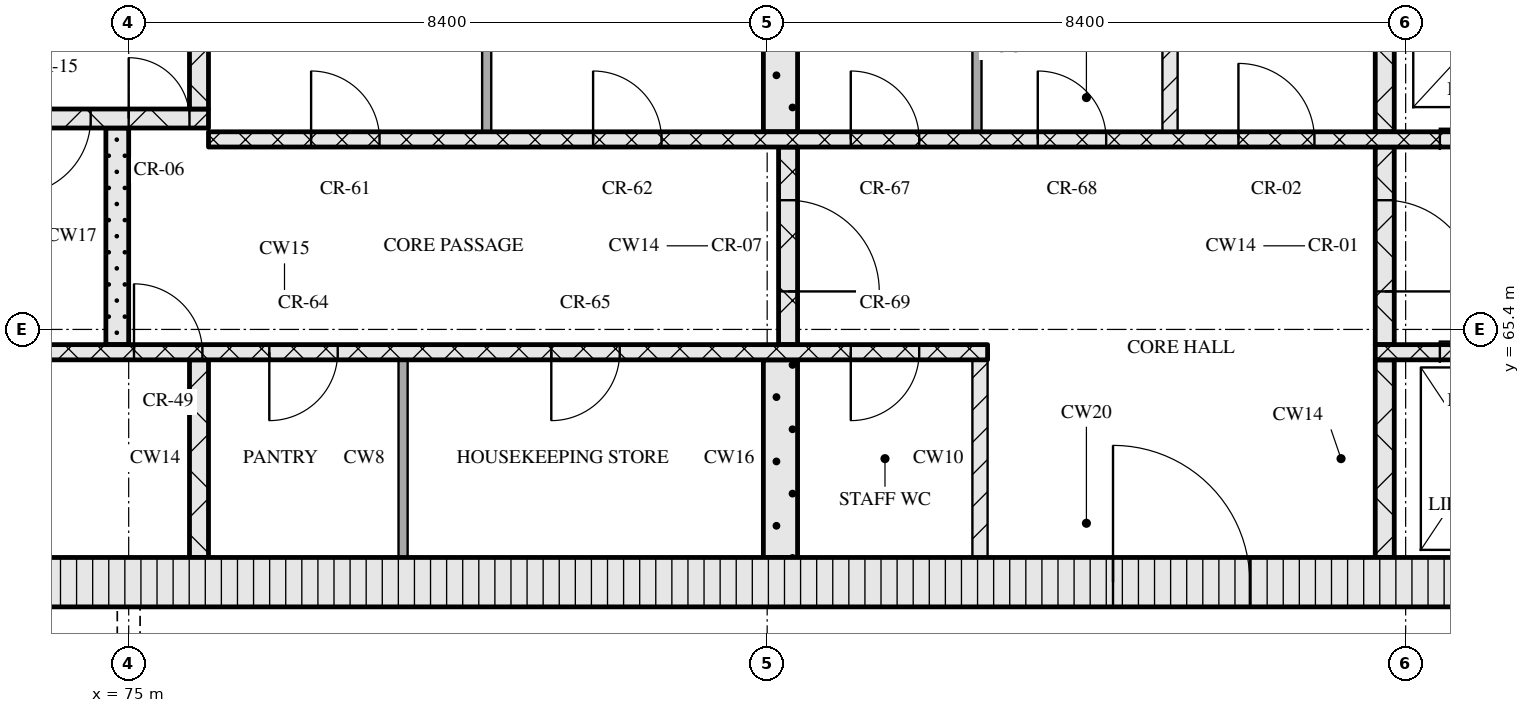
"""IFC4 building model, lengths in metres.
Left out: names, types, materials, properties, quantities, classifications, styles, units other than length and angle.
Written with IfcOpenShell. Run it as: python <this file> out.ifc"""

import sys

from ifc_helpers import new_model, si_unit, direction, frame, frame_2d, origin, place, context, subcontext, project, spatial, rectangle, extrude, element, fill, save


model = new_model("IFC4")
c1 = context("Model", 3, precision=1e-05, world=origin(), true_north=direction((0.0, 1.0)))
c2 = subcontext(c1, "Body", "Model", "MODEL_VIEW")
j1 = project(units=[si_unit("LENGTHUNIT", "METRE"), si_unit("PLANEANGLEUNIT", "RADIAN")], contexts=[c1])
p1 = place(None, origin())
s1 = spatial("IfcSite", under=j1, at=p1, CompositionType="ELEMENT")
p2 = place(p1, origin())
s2 = spatial("IfcBuilding", under=s1, at=p2, CompositionType="ELEMENT")
p3 = place(p2, frame((0.0, 0.0, 227.1)))
s3 = spatial("IfcBuildingStorey", under=s2, at=p3, CompositionType="ELEMENT", Elevation=227.1)
p4 = place(p3, frame((67.15, 62.075, 0.0), z_axis=(0.0, 0.0, 1.0), x_axis=(1.0, 0.0, 0.0)))
e1 = element("IfcWall", 1, at=p4, inside=s3, PredefinedType="SOLIDWALL", context=c2, shape_type="SweptSolid", body=[
    extrude(rectangle(XDim=40.9, YDim=0.65, at=frame_2d((20.45, 0.0))), origin(), (0.0, 0.0, 1.0), 3.32),
])
p5 = place(p4, frame((20.8, 0.0, 0.0)))
e2 = element("IfcOpeningElement", 2, at=p5, cuts=e1, PredefinedType="OPENING", context=c2, shape_type="SweptSolid", body=[
    extrude(rectangle(XDim=1.8, YDim=2.1, at=frame_2d((0.9, 1.05))), frame((0.0, 0.335, 0.0), z_axis=(0.0, -1.0, 0.0), x_axis=(1.0, 0.0, 0.0)), (0.0, 0.0, 1.0), 0.67),
])
p6 = place(p3, frame((75.925, 62.4, 0.0), z_axis=(0.0, 0.0, 1.0), x_axis=(0.0, 1.0, 0.0)))
e3 = element("IfcWall", 3, at=p6, inside=s3, PredefinedType="SOLIDWALL", context=c2, shape_type="SweptSolid", body=[
    extrude(rectangle(XDim=2.6, YDim=0.25, at=frame_2d((1.3, 0.0))), origin(), (0.0, 0.0, 1.0), 3.32),
])
p7 = place(p3, frame((78.61, 62.4, 0.0), z_axis=(0.0, 0.0, 1.0), x_axis=(0.0, 1.0, 0.0)))
e4 = element("IfcWall", 4, at=p7, inside=s3, PredefinedType="PARTITIONING", context=c2, shape_type="SweptSolid", body=[
    extrude(rectangle(XDim=2.6, YDim=0.12, at=frame_2d((1.3, 0.0))), origin(), (0.0, 0.0, 1.0), 3.32),
])
p8 = place(p3, frame((83.575, 62.4, 0.0), z_axis=(0.0, 0.0, 1.0), x_axis=(0.0, 1.0, 0.0)))
e5 = element("IfcWall", 5, at=p8, inside=s3, PredefinedType="SOLIDWALL", context=c2, shape_type="SweptSolid", body=[
    extrude(rectangle(XDim=2.6, YDim=0.45, at=frame_2d((1.3, 0.0))), origin(), (0.0, 0.0, 1.0), 3.32),
])
p9 = place(p3, frame((86.2, 62.4, 0.0), z_axis=(0.0, 0.0, 1.0), x_axis=(0.0, 1.0, 0.0)))
e6 = element("IfcWall", 6, at=p9, inside=s3, PredefinedType="PARTITIONING", context=c2, shape_type="SweptSolid", body=[
    extrude(rectangle(XDim=2.6, YDim=0.2, at=frame_2d((1.3, 0.0))), origin(), (0.0, 0.0, 1.0), 3.32),
])
p10 = place(p3, frame((91.525, 62.4, 0.0), z_axis=(0.0, 0.0, 1.0), x_axis=(0.0, 1.0, 0.0)))
e7 = element("IfcWall", 7, at=p10, inside=s3, PredefinedType="SOLIDWALL", context=c2, shape_type="SweptSolid", body=[
    extrude(rectangle(XDim=2.6, YDim=0.25, at=frame_2d((1.3, 0.0))), origin(), (0.0, 0.0, 1.0), 3.32),
])
p11 = place(p3, frame((67.8, 65.1, 0.0), z_axis=(0.0, 0.0, 1.0), x_axis=(1.0, 0.0, 0.0)))
e8 = element("IfcWall", 8, at=p11, inside=s3, PredefinedType="SOLIDWALL", context=c2, shape_type="SweptSolid", body=[
    extrude(rectangle(XDim=18.5, YDim=0.2, at=frame_2d((9.25, 0.0))), origin(), (0.0, 0.0, 1.0), 3.32),
])
p12 = place(p11, frame((7.27, 0.0, 0.0)))
e9 = element("IfcOpeningElement", 9, at=p12, cuts=e8, PredefinedType="OPENING", context=c2, shape_type="SweptSolid", body=[
    extrude(rectangle(XDim=0.9, YDim=2.1, at=frame_2d((0.45, 1.05))), frame((0.0, 0.11, 0.0), z_axis=(0.0, -1.0, 0.0), x_axis=(1.0, 0.0, 0.0)), (0.0, 0.0, 1.0), 0.22),
])
p13 = place(p11, frame((9.05, 0.0, 0.0)))
e10 = element("IfcOpeningElement", 10, at=p13, cuts=e8, PredefinedType="OPENING", context=c2, shape_type="SweptSolid", body=[
    extrude(rectangle(XDim=0.9, YDim=2.1, at=frame_2d((0.45, 1.05))), frame((0.0, 0.11, 0.0), z_axis=(0.0, -1.0, 0.0), x_axis=(1.0, 0.0, 0.0)), (0.0, 0.0, 1.0), 0.22),
])
p14 = place(p11, frame((12.76, 0.0, 0.0)))
e11 = element("IfcOpeningElement", 11, at=p14, cuts=e8, PredefinedType="OPENING", context=c2, shape_type="SweptSolid", body=[
    extrude(rectangle(XDim=0.9, YDim=2.1, at=frame_2d((0.45, 1.05))), frame((0.0, 0.11, 0.0), z_axis=(0.0, -1.0, 0.0), x_axis=(1.0, 0.0, 0.0)), (0.0, 0.0, 1.0), 0.22),
])
p15 = place(p11, frame((16.7, 0.0, 0.0)))
e12 = element("IfcOpeningElement", 12, at=p15, cuts=e8, PredefinedType="OPENING", context=c2, shape_type="SweptSolid", body=[
    extrude(rectangle(XDim=0.9, YDim=2.1, at=frame_2d((0.45, 1.05))), frame((0.0, 0.11, 0.0), z_axis=(0.0, -1.0, 0.0), x_axis=(1.0, 0.0, 0.0)), (0.0, 0.0, 1.0), 0.22),
])
p16 = place(p3, frame((91.4, 65.1, 0.0), z_axis=(0.0, 0.0, 1.0), x_axis=(1.0, 0.0, 0.0)))
e13 = element("IfcWall", 13, at=p16, inside=s3, PredefinedType="SOLIDWALL", context=c2, shape_type="SweptSolid", body=[
    extrude(rectangle(XDim=16.0, YDim=0.2, at=frame_2d((8.0, 0.0))), origin(), (0.0, 0.0, 1.0), 3.32),
])
p17 = place(p16, frame((0.85, 0.0, 0.0)))
e14 = element("IfcOpeningElement", 14, at=p17, cuts=e13, PredefinedType="OPENING", context=c2, shape_type="SweptSolid", body=[
    extrude(rectangle(XDim=1.1, YDim=2.1, at=frame_2d((0.55, 1.05))), frame((0.0, 0.11, 0.0), z_axis=(0.0, -1.0, 0.0), x_axis=(1.0, 0.0, 0.0)), (0.0, 0.0, 1.0), 0.22),
])
p18 = place(p16, frame((3.35, 0.0, 0.0)))
e15 = element("IfcOpeningElement", 15, at=p18, cuts=e13, PredefinedType="OPENING", context=c2, shape_type="SweptSolid", body=[
    extrude(rectangle(XDim=1.1, YDim=2.1, at=frame_2d((0.55, 1.05))), frame((0.0, 0.11, 0.0), z_axis=(0.0, -1.0, 0.0), x_axis=(1.0, 0.0, 0.0)), (0.0, 0.0, 1.0), 0.22),
])
p19 = place(p16, frame((5.85, 0.0, 0.0)))
e16 = element("IfcOpeningElement", 16, at=p19, cuts=e13, PredefinedType="OPENING", context=c2, shape_type="SweptSolid", body=[
    extrude(rectangle(XDim=1.1, YDim=2.1, at=frame_2d((0.55, 1.05))), frame((0.0, 0.11, 0.0), z_axis=(0.0, -1.0, 0.0), x_axis=(1.0, 0.0, 0.0)), (0.0, 0.0, 1.0), 0.22),
])
p20 = place(p16, frame((7.83, 0.0, 0.0)))
e17 = element("IfcOpeningElement", 17, at=p20, cuts=e13, PredefinedType="OPENING", context=c2, shape_type="SweptSolid", body=[
    extrude(rectangle(XDim=0.9, YDim=2.1, at=frame_2d((0.45, 1.05))), frame((0.0, 0.11, 0.0), z_axis=(0.0, -1.0, 0.0), x_axis=(1.0, 0.0, 0.0)), (0.0, 0.0, 1.0), 0.22),
])
p21 = place(p3, frame((74.85, 65.2, 0.0), z_axis=(0.0, 0.0, 1.0), x_axis=(0.0, 1.0, 0.0)))
e18 = element("IfcWall", 18, at=p21, inside=s3, PredefinedType="SOLIDWALL", context=c2, shape_type="SweptSolid", body=[
    extrude(rectangle(XDim=2.85, YDim=0.3, at=frame_2d((1.425, 0.0))), origin(), (0.0, 0.0, 1.0), 3.32),
])
p22 = place(p3, frame((83.675, 65.2, 0.0), z_axis=(0.0, 0.0, 1.0), x_axis=(0.0, 1.0, 0.0)))
e19 = element("IfcWall", 19, at=p22, inside=s3, PredefinedType="SOLIDWALL", context=c2, shape_type="SweptSolid", body=[
    extrude(rectangle(XDim=2.6, YDim=0.25, at=frame_2d((1.3, 0.0))), origin(), (0.0, 0.0, 1.0), 3.32),
])
p23 = place(p22, frame((0.7, 0.0, 0.0)))
e20 = element("IfcOpeningElement", 20, at=p23, cuts=e19, PredefinedType="OPENING", context=c2, shape_type="SweptSolid", body=[
    extrude(rectangle(XDim=1.2, YDim=2.1, at=frame_2d((0.6, 1.05))), frame((0.0, 0.135, 0.0), z_axis=(0.0, -1.0, 0.0), x_axis=(1.0, 0.0, 0.0)), (0.0, 0.0, 1.0), 0.27),
])
p24 = place(p3, frame((91.525, 65.2, 0.0), z_axis=(0.0, 0.0, 1.0), x_axis=(0.0, 1.0, 0.0)))
e21 = element("IfcWall", 21, at=p24, inside=s3, PredefinedType="SOLIDWALL", context=c2, shape_type="SweptSolid", body=[
    extrude(rectangle(XDim=2.6, YDim=0.25, at=frame_2d((1.3, 0.0))), origin(), (0.0, 0.0, 1.0), 3.32),
])
p25 = place(p24, frame((0.7, 0.0, 0.0)))
e22 = element("IfcOpeningElement", 22, at=p25, cuts=e21, PredefinedType="OPENING", context=c2, shape_type="SweptSolid", body=[
    extrude(rectangle(XDim=1.2, YDim=2.1, at=frame_2d((0.6, 1.05))), frame((0.0, 0.135, 0.0), z_axis=(0.0, -1.0, 0.0), x_axis=(1.0, 0.0, 0.0)), (0.0, 0.0, 1.0), 0.27),
])
p26 = place(p3, frame((76.05, 67.9, 0.0), z_axis=(0.0, 0.0, 1.0), x_axis=(1.0, 0.0, 0.0)))
e23 = element("IfcWall", 23, at=p26, inside=s3, PredefinedType="SOLIDWALL", context=c2, shape_type="SweptSolid", body=[
    extrude(rectangle(XDim=23.1, YDim=0.2, at=frame_2d((11.55, 0.0))), origin(), (0.0, 0.0, 1.0), 3.32),
])
p27 = place(p26, frame((1.35, 0.0, 0.0)))
e24 = element("IfcOpeningElement", 24, at=p27, cuts=e23, PredefinedType="OPENING", context=c2, shape_type="SweptSolid", body=[
    extrude(rectangle(XDim=0.9, YDim=2.1, at=frame_2d((0.45, 1.05))), frame((0.0, 0.11, 0.0), z_axis=(0.0, -1.0, 0.0), x_axis=(1.0, 0.0, 0.0)), (0.0, 0.0, 1.0), 0.22),
])
p28 = place(p26, frame((5.06, 0.0, 0.0)))
e25 = element("IfcOpeningElement", 25, at=p28, cuts=e23, PredefinedType="OPENING", context=c2, shape_type="SweptSolid", body=[
    extrude(rectangle(XDim=0.9, YDim=2.1, at=frame_2d((0.45, 1.05))), frame((0.0, 0.11, 0.0), z_axis=(0.0, -1.0, 0.0), x_axis=(1.0, 0.0, 0.0)), (0.0, 0.0, 1.0), 0.22),
])
p29 = place(p26, frame((8.45, 0.0, 0.0)))
e26 = element("IfcOpeningElement", 26, at=p29, cuts=e23, PredefinedType="OPENING", context=c2, shape_type="SweptSolid", body=[
    extrude(rectangle(XDim=0.9, YDim=2.1, at=frame_2d((0.45, 1.05))), frame((0.0, 0.11, 0.0), z_axis=(0.0, -1.0, 0.0), x_axis=(1.0, 0.0, 0.0)), (0.0, 0.0, 1.0), 0.22),
])
p30 = place(p26, frame((10.91, 0.0, 0.0)))
e27 = element("IfcOpeningElement", 27, at=p30, cuts=e23, PredefinedType="OPENING", context=c2, shape_type="SweptSolid", body=[
    extrude(rectangle(XDim=0.9, YDim=2.1, at=frame_2d((0.45, 1.05))), frame((0.0, 0.11, 0.0), z_axis=(0.0, -1.0, 0.0), x_axis=(1.0, 0.0, 0.0)), (0.0, 0.0, 1.0), 0.22),
])
p31 = place(p26, frame((13.55, 0.0, 0.0)))
e28 = element("IfcOpeningElement", 28, at=p31, cuts=e23, PredefinedType="OPENING", context=c2, shape_type="SweptSolid", body=[
    extrude(rectangle(XDim=1.0, YDim=2.1, at=frame_2d((0.5, 1.05))), frame((0.0, 0.11, 0.0), z_axis=(0.0, -1.0, 0.0), x_axis=(1.0, 0.0, 0.0)), (0.0, 0.0, 1.0), 0.22),
])
p32 = place(p26, frame((16.2, 0.0, 0.0)))
e29 = element("IfcOpeningElement", 29, at=p32, cuts=e23, PredefinedType="OPENING", context=c2, shape_type="SweptSolid", body=[
    extrude(rectangle(XDim=1.1, YDim=2.1, at=frame_2d((0.55, 1.05))), frame((0.0, 0.11, 0.0), z_axis=(0.0, -1.0, 0.0), x_axis=(1.0, 0.0, 0.0)), (0.0, 0.0, 1.0), 0.22),
])
p33 = place(p26, frame((18.7, 0.0, 0.0)))
e30 = element("IfcOpeningElement", 30, at=p33, cuts=e23, PredefinedType="OPENING", context=c2, shape_type="SweptSolid", body=[
    extrude(rectangle(XDim=1.1, YDim=2.1, at=frame_2d((0.55, 1.05))), frame((0.0, 0.11, 0.0), z_axis=(0.0, -1.0, 0.0), x_axis=(1.0, 0.0, 0.0)), (0.0, 0.0, 1.0), 0.22),
])
p34 = place(p26, frame((21.2, 0.0, 0.0)))
e31 = element("IfcOpeningElement", 31, at=p34, cuts=e23, PredefinedType="OPENING", context=c2, shape_type="SweptSolid", body=[
    extrude(rectangle(XDim=1.1, YDim=2.1, at=frame_2d((0.55, 1.05))), frame((0.0, 0.11, 0.0), z_axis=(0.0, -1.0, 0.0), x_axis=(1.0, 0.0, 0.0)), (0.0, 0.0, 1.0), 0.22),
])
p35 = place(p3, frame((79.71, 68.0, 0.0), z_axis=(0.0, 0.0, 1.0), x_axis=(0.0, 1.0, 0.0)))
e32 = element("IfcWall", 32, at=p35, inside=s3, PredefinedType="PARTITIONING", context=c2, shape_type="SweptSolid", body=[
    extrude(rectangle(XDim=2.6, YDim=0.12, at=frame_2d((1.3, 0.0))), origin(), (0.0, 0.0, 1.0), 3.32),
])
p36 = place(p3, frame((83.575, 68.0, 0.0), z_axis=(0.0, 0.0, 1.0), x_axis=(0.0, 1.0, 0.0)))
e33 = element("IfcWall", 33, at=p36, inside=s3, PredefinedType="SOLIDWALL", context=c2, shape_type="SweptSolid", body=[
    extrude(rectangle(XDim=2.6, YDim=0.45, at=frame_2d((1.3, 0.0))), origin(), (0.0, 0.0, 1.0), 3.32),
])
p37 = place(p3, frame((86.16, 68.0, 0.0), z_axis=(0.0, 0.0, 1.0), x_axis=(0.0, 1.0, 0.0)))
e34 = element("IfcWall", 34, at=p37, inside=s3, PredefinedType="PARTITIONING", context=c2, shape_type="SweptSolid", body=[
    extrude(rectangle(XDim=2.6, YDim=0.12, at=frame_2d((1.3, 0.0))), origin(), (0.0, 0.0, 1.0), 3.32),
])
p38 = place(p3, frame((88.7, 68.0, 0.0), z_axis=(0.0, 0.0, 1.0), x_axis=(0.0, 1.0, 0.0)))
e35 = element("IfcWall", 35, at=p38, inside=s3, PredefinedType="PARTITIONING", context=c2, shape_type="SweptSolid", body=[
    extrude(rectangle(XDim=2.6, YDim=0.2, at=frame_2d((1.3, 0.0))), origin(), (0.0, 0.0, 1.0), 3.32),
])
p39 = place(p3, frame((91.525, 68.0, 0.0), z_axis=(0.0, 0.0, 1.0), x_axis=(0.0, 1.0, 0.0)))
e36 = element("IfcWall", 36, at=p39, inside=s3, PredefinedType="SOLIDWALL", context=c2, shape_type="SweptSolid", body=[
    extrude(rectangle(XDim=2.6, YDim=0.25, at=frame_2d((1.3, 0.0))), origin(), (0.0, 0.0, 1.0), 3.32),
])
p40 = place(p3, frame((67.8, 68.175, 0.0), z_axis=(0.0, 0.0, 1.0), x_axis=(1.0, 0.0, 0.0)))
e37 = element("IfcWall", 37, at=p40, inside=s3, PredefinedType="SOLIDWALL", context=c2, shape_type="SweptSolid", body=[
    extrude(rectangle(XDim=8.25, YDim=0.25, at=frame_2d((4.125, 0.0))), origin(), (0.0, 0.0, 1.0), 3.32),
])
p41 = place(p40, frame((5.7, 0.0, 0.0)))
e38 = element("IfcOpeningElement", 38, at=p41, cuts=e37, PredefinedType="OPENING", context=c2, shape_type="SweptSolid", body=[
    extrude(rectangle(XDim=1.0, YDim=2.1, at=frame_2d((0.5, 1.05))), frame((0.0, 0.135, 0.0), z_axis=(0.0, -1.0, 0.0), x_axis=(1.0, 0.0, 0.0)), (0.0, 0.0, 1.0), 0.27),
])
p42 = place(p40, frame((7.2, 0.0, 0.0)))
e39 = element("IfcOpeningElement", 39, at=p42, cuts=e37, PredefinedType="OPENING", context=c2, shape_type="SweptSolid", body=[
    extrude(rectangle(XDim=0.8, YDim=2.1, at=frame_2d((0.4, 1.05))), frame((0.0, 0.135, 0.0), z_axis=(0.0, -1.0, 0.0), x_axis=(1.0, 0.0, 0.0)), (0.0, 0.0, 1.0), 0.27),
])
p43 = place(p3, frame((75.925, 68.3, 0.0), z_axis=(0.0, 0.0, 1.0), x_axis=(0.0, 1.0, 0.0)))
e40 = element("IfcWall", 40, at=p43, inside=s3, PredefinedType="SOLIDWALL", context=c2, shape_type="SweptSolid", body=[
    extrude(rectangle(XDim=2.3, YDim=0.25, at=frame_2d((1.15, 0.0))), origin(), (0.0, 0.0, 1.0), 3.32),
])
p44 = place(p5, origin())
e41 = element("IfcDoor", 41, at=p44, inside=s3, OperationType="DOUBLE_DOOR_SINGLE_SWING", PredefinedType="DOOR", context=c2, shape_type="SweptSolid", body=[
    extrude(rectangle(XDim=1.8, YDim=2.1, at=frame_2d((0.9, 1.05))), frame((0.0, 0.025, 0.0), z_axis=(0.0, -1.0, 0.0), x_axis=(1.0, 0.0, 0.0)), (0.0, 0.0, 1.0), 0.05),
])
fill(e2, e41)
p45 = place(p12, origin())
e42 = element("IfcDoor", 42, at=p45, inside=s3, OperationType="SINGLE_SWING_LEFT", PredefinedType="DOOR", context=c2, shape_type="SweptSolid", body=[
    extrude(rectangle(XDim=0.9, YDim=2.1, at=frame_2d((0.45, 1.05))), frame((0.0, 0.025, 0.0), z_axis=(0.0, -1.0, 0.0), x_axis=(1.0, 0.0, 0.0)), (0.0, 0.0, 1.0), 0.05),
])
fill(e9, e42)
p46 = place(p13, origin())
e43 = element("IfcDoor", 43, at=p46, inside=s3, OperationType="SINGLE_SWING_RIGHT", PredefinedType="DOOR", context=c2, shape_type="SweptSolid", body=[
    extrude(rectangle(XDim=0.9, YDim=2.1, at=frame_2d((0.45, 1.05))), frame((0.0, 0.025, 0.0), z_axis=(0.0, -1.0, 0.0), x_axis=(1.0, 0.0, 0.0)), (0.0, 0.0, 1.0), 0.05),
])
fill(e10, e43)
p47 = place(p14, origin())
e44 = element("IfcDoor", 44, at=p47, inside=s3, OperationType="SINGLE_SWING_RIGHT", PredefinedType="DOOR", context=c2, shape_type="SweptSolid", body=[
    extrude(rectangle(XDim=0.9, YDim=2.1, at=frame_2d((0.45, 1.05))), frame((0.0, 0.025, 0.0), z_axis=(0.0, -1.0, 0.0), x_axis=(1.0, 0.0, 0.0)), (0.0, 0.0, 1.0), 0.05),
])
fill(e11, e44)
p48 = place(p15, origin())
e45 = element("IfcDoor", 45, at=p48, inside=s3, OperationType="SINGLE_SWING_RIGHT", PredefinedType="DOOR", context=c2, shape_type="SweptSolid", body=[
    extrude(rectangle(XDim=0.9, YDim=2.1, at=frame_2d((0.45, 1.05))), frame((0.0, 0.025, 0.0), z_axis=(0.0, -1.0, 0.0), x_axis=(1.0, 0.0, 0.0)), (0.0, 0.0, 1.0), 0.05),
])
fill(e12, e45)
p49 = place(p17, origin())
e46 = element("IfcDoor", 46, at=p49, inside=s3, OperationType="SLIDING_TO_LEFT", PredefinedType="DOOR", context=c2, shape_type="SweptSolid", body=[
    extrude(rectangle(XDim=1.1, YDim=2.1, at=frame_2d((0.55, 1.05))), frame((0.0, 0.025, 0.0), z_axis=(0.0, -1.0, 0.0), x_axis=(1.0, 0.0, 0.0)), (0.0, 0.0, 1.0), 0.05),
])
fill(e14, e46)
p50 = place(p23, origin())
e47 = element("IfcDoor", 47, at=p50, inside=s3, OperationType="SINGLE_SWING_RIGHT", PredefinedType="DOOR", context=c2, shape_type="SweptSolid", body=[
    extrude(rectangle(XDim=1.2, YDim=2.1, at=frame_2d((0.6, 1.05))), frame((0.0, 0.025, 0.0), z_axis=(0.0, -1.0, 0.0), x_axis=(1.0, 0.0, 0.0)), (0.0, 0.0, 1.0), 0.05),
])
fill(e20, e47)
p51 = place(p25, origin())
e48 = element("IfcDoor", 48, at=p51, inside=s3, OperationType="SINGLE_SWING_RIGHT", PredefinedType="DOOR", context=c2, shape_type="SweptSolid", body=[
    extrude(rectangle(XDim=1.2, YDim=2.1, at=frame_2d((0.6, 1.05))), frame((0.0, 0.025, 0.0), z_axis=(0.0, -1.0, 0.0), x_axis=(1.0, 0.0, 0.0)), (0.0, 0.0, 1.0), 0.05),
])
fill(e22, e48)
p52 = place(p27, origin())
e49 = element("IfcDoor", 49, at=p52, inside=s3, OperationType="SINGLE_SWING_LEFT", PredefinedType="DOOR", context=c2, shape_type="SweptSolid", body=[
    extrude(rectangle(XDim=0.9, YDim=2.1, at=frame_2d((0.45, 1.05))), frame((0.0, 0.025, 0.0), z_axis=(0.0, -1.0, 0.0), x_axis=(1.0, 0.0, 0.0)), (0.0, 0.0, 1.0), 0.05),
])
fill(e24, e49)
p53 = place(p28, origin())
e50 = element("IfcDoor", 50, at=p53, inside=s3, OperationType="SINGLE_SWING_LEFT", PredefinedType="DOOR", context=c2, shape_type="SweptSolid", body=[
    extrude(rectangle(XDim=0.9, YDim=2.1, at=frame_2d((0.45, 1.05))), frame((0.0, 0.025, 0.0), z_axis=(0.0, -1.0, 0.0), x_axis=(1.0, 0.0, 0.0)), (0.0, 0.0, 1.0), 0.05),
])
fill(e25, e50)
p54 = place(p29, origin())
e51 = element("IfcDoor", 51, at=p54, inside=s3, OperationType="SINGLE_SWING_LEFT", PredefinedType="DOOR", context=c2, shape_type="SweptSolid", body=[
    extrude(rectangle(XDim=0.9, YDim=2.1, at=frame_2d((0.45, 1.05))), frame((0.0, 0.025, 0.0), z_axis=(0.0, -1.0, 0.0), x_axis=(1.0, 0.0, 0.0)), (0.0, 0.0, 1.0), 0.05),
])
fill(e26, e51)
p55 = place(p30, origin())
e52 = element("IfcDoor", 52, at=p55, inside=s3, OperationType="SINGLE_SWING_LEFT", PredefinedType="DOOR", context=c2, shape_type="SweptSolid", body=[
    extrude(rectangle(XDim=0.9, YDim=2.1, at=frame_2d((0.45, 1.05))), frame((0.0, 0.025, 0.0), z_axis=(0.0, -1.0, 0.0), x_axis=(1.0, 0.0, 0.0)), (0.0, 0.0, 1.0), 0.05),
])
fill(e27, e52)
p56 = place(p31, origin())
e53 = element("IfcDoor", 53, at=p56, inside=s3, OperationType="SINGLE_SWING_LEFT", PredefinedType="DOOR", context=c2, shape_type="SweptSolid", body=[
    extrude(rectangle(XDim=1.0, YDim=2.1, at=frame_2d((0.5, 1.05))), frame((0.0, 0.025, 0.0), z_axis=(0.0, -1.0, 0.0), x_axis=(1.0, 0.0, 0.0)), (0.0, 0.0, 1.0), 0.05),
])
fill(e28, e53)
p57 = place(p32, origin())
e54 = element("IfcDoor", 54, at=p57, inside=s3, OperationType="SLIDING_TO_RIGHT", PredefinedType="DOOR", context=c2, shape_type="SweptSolid", body=[
    extrude(rectangle(XDim=1.1, YDim=2.1, at=frame_2d((0.55, 1.05))), frame((0.0, 0.025, 0.0), z_axis=(0.0, -1.0, 0.0), x_axis=(1.0, 0.0, 0.0)), (0.0, 0.0, 1.0), 0.05),
])
fill(e29, e54)
p58 = place(p41, origin())
e55 = element("IfcDoor", 55, at=p58, inside=s3, OperationType="SINGLE_SWING_RIGHT", PredefinedType="DOOR", context=c2, shape_type="SweptSolid", body=[
    extrude(rectangle(XDim=1.0, YDim=2.1, at=frame_2d((0.5, 1.05))), frame((0.0, 0.025, 0.0), z_axis=(0.0, -1.0, 0.0), x_axis=(1.0, 0.0, 0.0)), (0.0, 0.0, 1.0), 0.05),
])
fill(e38, e55)
p59 = place(p42, origin())
e56 = element("IfcDoor", 56, at=p59, inside=s3, OperationType="SINGLE_SWING_LEFT", PredefinedType="DOOR", context=c2, shape_type="SweptSolid", body=[
    extrude(rectangle(XDim=0.8, YDim=2.1, at=frame_2d((0.4, 1.05))), frame((0.0, 0.025, 0.0), z_axis=(0.0, -1.0, 0.0), x_axis=(1.0, 0.0, 0.0)), (0.0, 0.0, 1.0), 0.05),
])
fill(e39, e56)
save(model, sys.argv[1])
